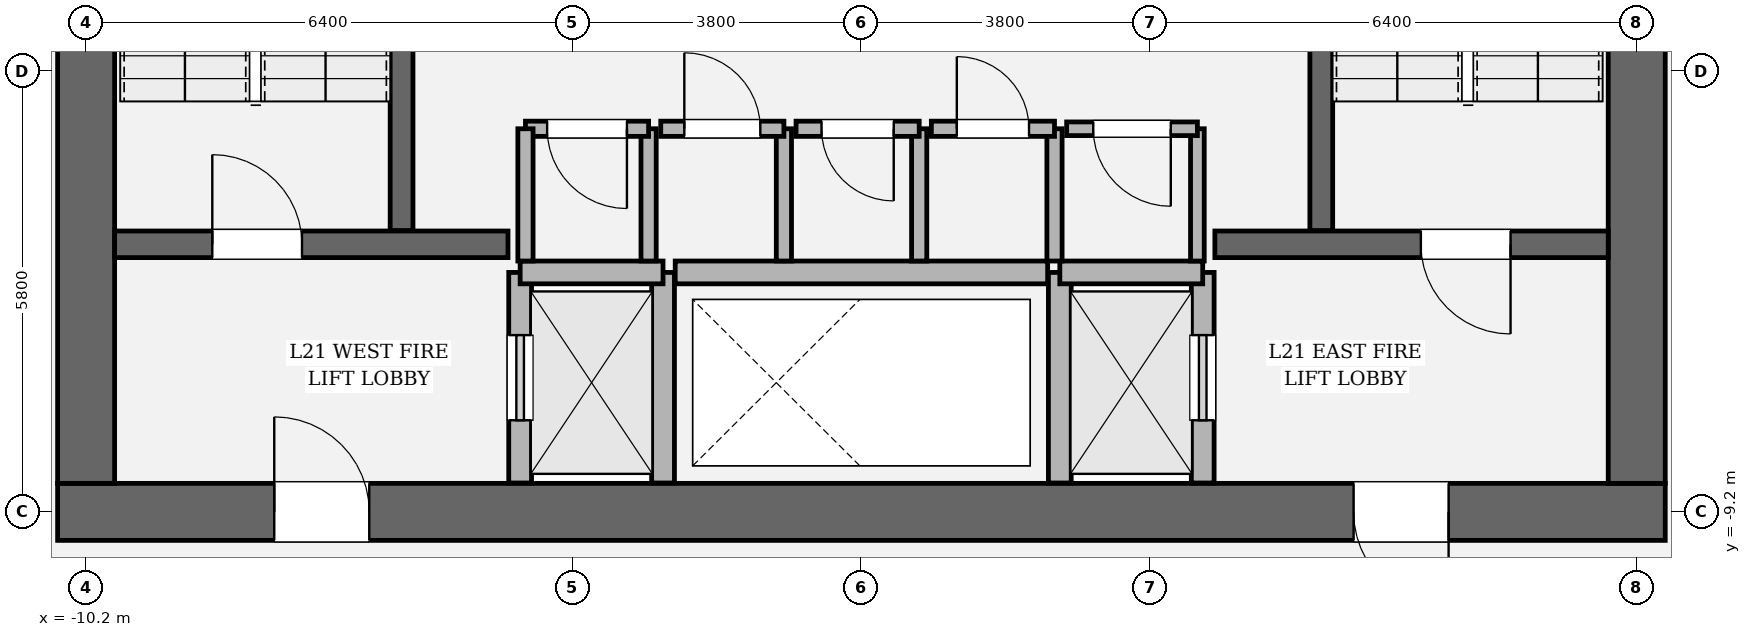
"""IFC4 building model, lengths in metres.
Left out: names, types, materials, properties, quantities, classifications, styles, units other than length and angle.
Written with IfcOpenShell. Run it as: python <this file> out.ifc"""

import sys

from ifc_helpers import new_model, si_unit, direction, frame, frame_2d, origin, place, context, subcontext, project, spatial, rectangle, extrude, element, fill, save


model = new_model("IFC4")
c1 = context("Model", 3, precision=1e-05, world=origin(), true_north=direction((0.0, 1.0)))
c2 = subcontext(c1, "Body", "Model", "MODEL_VIEW")
j1 = project(units=[si_unit("LENGTHUNIT", "METRE"), si_unit("PLANEANGLEUNIT", "RADIAN")], contexts=[c1])
p1 = place(None, origin())
s1 = spatial("IfcSite", under=j1, at=p1, CompositionType="ELEMENT")
p2 = place(p1, origin())
s2 = spatial("IfcBuilding", under=s1, at=p2, CompositionType="ELEMENT")
p3 = place(p2, frame((0.0, 0.0, 93.0)))
s3 = spatial("IfcBuildingStorey", under=s2, at=p3, CompositionType="ELEMENT", Elevation=93.0)
p4 = place(p3, frame((10.575, -9.2, 0.0), z_axis=(0.0, 0.0, 1.0), x_axis=(-1.0, 0.0, 0.0)))
e1 = element("IfcWall", 1, at=p4, inside=s3, PredefinedType="SHEAR", context=c2, shape_type="SweptSolid", body=[
    extrude(rectangle(XDim=21.15, YDim=0.75, at=frame_2d((10.575, 0.0))), origin(), (0.0, 0.0, 1.0), 4.05),
])
p5 = place(p4, frame((2.85, 0.0, 0.0)))
e2 = element("IfcOpeningElement", 2, at=p5, cuts=e1, PredefinedType="OPENING", context=c2, shape_type="SweptSolid", body=[
    extrude(rectangle(XDim=1.25, YDim=2.25, at=frame_2d((0.625, 1.125))), frame((0.0, 0.385, 0.0), z_axis=(0.0, -1.0, 0.0), x_axis=(1.0, 0.0, 0.0)), (0.0, 0.0, 1.0), 0.77),
])
p6 = place(p4, frame((17.05, 0.0, 0.0)))
e3 = element("IfcOpeningElement", 3, at=p6, cuts=e1, PredefinedType="OPENING", context=c2, shape_type="SweptSolid", body=[
    extrude(rectangle(XDim=1.25, YDim=2.25, at=frame_2d((0.625, 1.125))), frame((0.0, 0.385, 0.0), z_axis=(0.0, -1.0, 0.0), x_axis=(1.0, 0.0, 0.0)), (0.0, 0.0, 1.0), 0.77),
])
p7 = place(p3, frame((-10.2, -8.825, 0.0), z_axis=(0.0, 0.0, 1.0), x_axis=(0.0, 1.0, 0.0)))
e4 = element("IfcWall", 4, at=p7, inside=s3, PredefinedType="SHEAR", context=c2, shape_type="SweptSolid", body=[
    extrude(rectangle(XDim=17.65, YDim=0.75, at=frame_2d((8.825, 0.0))), origin(), (0.0, 0.0, 1.0), 4.05),
])
p8 = place(p7, frame((12.615, 0.0, 0.0)))
e5 = element("IfcOpeningElement", 5, at=p8, cuts=e4, PredefinedType="OPENING", context=c2, shape_type="SweptSolid", body=[
    extrude(rectangle(XDim=1.18, YDim=2.2, at=frame_2d((0.59, 1.1))), frame((0.0, 0.385, 0.0), z_axis=(0.0, -1.0, 0.0), x_axis=(1.0, 0.0, 0.0)), (0.0, 0.0, 1.0), 0.77),
])
p9 = place(p3, frame((10.2, 8.825, 0.0), z_axis=(0.0, 0.0, 1.0), x_axis=(0.0, -1.0, 0.0)))
e6 = element("IfcWall", 6, at=p9, inside=s3, PredefinedType="SHEAR", context=c2, shape_type="SweptSolid", body=[
    extrude(rectangle(XDim=17.65, YDim=0.75, at=frame_2d((8.825, 0.0))), origin(), (0.0, 0.0, 1.0), 4.05),
])
p10 = place(p9, frame((3.855, 0.0, 0.0)))
e7 = element("IfcOpeningElement", 7, at=p10, cuts=e6, PredefinedType="OPENING", context=c2, shape_type="SweptSolid", body=[
    extrude(rectangle(XDim=1.18, YDim=2.2, at=frame_2d((0.59, 1.1))), frame((0.0, 0.385, 0.0), z_axis=(0.0, -1.0, 0.0), x_axis=(1.0, 0.0, 0.0)), (0.0, 0.0, 1.0), 0.77),
])
for number, where, z_axis, x_axis in (
    (8, (-6.05, -5.5, 0.0), (0.0, 0.0, 1.0), (0.0, 1.0, 0.0)),
    (9, (6.05, 3.45, 0.0), (0.0, 0.0, 1.0), (0.0, -1.0, 0.0)),
):
    element("IfcWall", number, at=place(p3, frame(where, z_axis=z_axis, x_axis=x_axis)), inside=s3, PredefinedType="SOLIDWALL", context=c2, shape_type="SweptSolid", body=[
        extrude(rectangle(XDim=8.95, YDim=0.3, at=frame_2d((4.475, 0.0))), origin(), (0.0, 0.0, 1.0), 4.05),
    ])
p11 = place(p3, frame((-9.825, -5.68, 0.0), z_axis=(0.0, 0.0, 1.0), x_axis=(1.0, 0.0, 0.0)))
e10 = element("IfcWall", 10, at=p11, inside=s3, PredefinedType="SOLIDWALL", context=c2, shape_type="SweptSolid", body=[
    extrude(rectangle(XDim=5.175, YDim=0.35, at=frame_2d((2.587, 0.0))), origin(), (0.0, 0.0, 1.0), 4.05),
])
p12 = place(p11, frame((1.285, 0.0, 0.0)))
e11 = element("IfcOpeningElement", 11, at=p12, cuts=e10, PredefinedType="OPENING", context=c2, shape_type="SweptSolid", body=[
    extrude(rectangle(XDim=1.18, YDim=2.2, at=frame_2d((0.59, 1.1))), frame((0.0, 0.185, 0.0), z_axis=(0.0, -1.0, 0.0), x_axis=(1.0, 0.0, 0.0)), (0.0, 0.0, 1.0), 0.37),
])
p13 = place(p3, frame((4.65, -5.68, 0.0), z_axis=(0.0, 0.0, 1.0), x_axis=(1.0, 0.0, 0.0)))
e12 = element("IfcWall", 12, at=p13, inside=s3, PredefinedType="SOLIDWALL", context=c2, shape_type="SweptSolid", body=[
    extrude(rectangle(XDim=5.175, YDim=0.35, at=frame_2d((2.587, 0.0))), origin(), (0.0, 0.0, 1.0), 4.05),
])
p14 = place(p13, frame((2.71, 0.0, 0.0)))
e13 = element("IfcOpeningElement", 13, at=p14, cuts=e12, PredefinedType="OPENING", context=c2, shape_type="SweptSolid", body=[
    extrude(rectangle(XDim=1.18, YDim=2.2, at=frame_2d((0.59, 1.1))), frame((0.0, 0.185, 0.0), z_axis=(0.0, -1.0, 0.0), x_axis=(1.0, 0.0, 0.0)), (0.0, 0.0, 1.0), 0.37),
])
p15 = place(p3, frame((-4.49, -8.82, 0.0), z_axis=(0.0, 0.0, 1.0), x_axis=(0.0, 1.0, 0.0)))
e14 = element("IfcWall", 14, at=p15, inside=s3, PredefinedType="SOLIDWALL", context=c2, shape_type="SweptSolid", body=[
    extrude(rectangle(XDim=2.77, YDim=0.3, at=frame_2d((1.385, 0.0))), origin(), (0.0, 0.0, 1.0), 3.81),
])
p16 = place(p15, frame((0.825, 0.0, 0.0)))
e15 = element("IfcOpeningElement", 15, at=p16, cuts=e14, PredefinedType="OPENING", context=c2, shape_type="SweptSolid", body=[
    extrude(rectangle(XDim=1.12, YDim=2.25, at=frame_2d((0.56, 1.125))), frame((0.0, 0.16, 0.0), z_axis=(0.0, -1.0, 0.0), x_axis=(1.0, 0.0, 0.0)), (0.0, 0.0, 1.0), 0.32),
])
p17 = place(p3, frame((-2.61, -8.82, 0.0), z_axis=(0.0, 0.0, 1.0), x_axis=(0.0, 1.0, 0.0)))
e16 = element("IfcWall", 16, at=p17, inside=s3, PredefinedType="SOLIDWALL", context=c2, shape_type="SweptSolid", body=[
    extrude(rectangle(XDim=2.77, YDim=0.3, at=frame_2d((1.385, 0.0))), origin(), (0.0, 0.0, 1.0), 3.81),
])
p18 = place(p3, frame((-4.49, -6.05, 0.0), z_axis=(0.0, 0.0, 1.0), x_axis=(1.0, 0.0, 0.0)))
e17 = element("IfcWall", 17, at=p18, inside=s3, PredefinedType="SOLIDWALL", context=c2, shape_type="SweptSolid", body=[
    extrude(rectangle(XDim=1.88, YDim=0.3, at=frame_2d((0.94, 0.0))), origin(), (0.0, 0.0, 1.0), 3.81),
])
p19 = place(p3, frame((4.49, -8.82, 0.0), z_axis=(0.0, 0.0, 1.0), x_axis=(0.0, 1.0, 0.0)))
e18 = element("IfcWall", 18, at=p19, inside=s3, PredefinedType="SOLIDWALL", context=c2, shape_type="SweptSolid", body=[
    extrude(rectangle(XDim=2.77, YDim=0.3, at=frame_2d((1.385, 0.0))), origin(), (0.0, 0.0, 1.0), 3.81),
])
p20 = place(p19, frame((0.825, 0.0, 0.0)))
e19 = element("IfcOpeningElement", 19, at=p20, cuts=e18, PredefinedType="OPENING", context=c2, shape_type="SweptSolid", body=[
    extrude(rectangle(XDim=1.12, YDim=2.25, at=frame_2d((0.56, 1.125))), frame((0.0, 0.16, 0.0), z_axis=(0.0, -1.0, 0.0), x_axis=(1.0, 0.0, 0.0)), (0.0, 0.0, 1.0), 0.32),
])
p21 = place(p3, frame((2.61, -8.82, 0.0), z_axis=(0.0, 0.0, 1.0), x_axis=(0.0, 1.0, 0.0)))
e20 = element("IfcWall", 20, at=p21, inside=s3, PredefinedType="SOLIDWALL", context=c2, shape_type="SweptSolid", body=[
    extrude(rectangle(XDim=2.77, YDim=0.3, at=frame_2d((1.385, 0.0))), origin(), (0.0, 0.0, 1.0), 3.81),
])
p22 = place(p3, frame((2.61, -6.05, 0.0), z_axis=(0.0, 0.0, 1.0), x_axis=(1.0, 0.0, 0.0)))
e21 = element("IfcWall", 21, at=p22, inside=s3, PredefinedType="SOLIDWALL", context=c2, shape_type="SweptSolid", body=[
    extrude(rectangle(XDim=1.88, YDim=0.3, at=frame_2d((0.94, 0.0))), origin(), (0.0, 0.0, 1.0), 3.81),
])
p23 = place(p3, frame((-2.45, -6.05, 0.0), z_axis=(0.0, 0.0, 1.0), x_axis=(1.0, 0.0, 0.0)))
e22 = element("IfcWall", 22, at=p23, inside=s3, PredefinedType="SOLIDWALL", context=c2, shape_type="SweptSolid", body=[
    extrude(rectangle(XDim=4.9, YDim=0.3, at=frame_2d((2.45, 0.0))), origin(), (0.0, 0.0, 1.0), 3.81),
])
p24 = place(p3, frame((-2.8, -5.9, 0.0), z_axis=(0.0, 0.0, 1.0), x_axis=(0.0, 1.0, 0.0)))
e23 = element("IfcWall", 23, at=p24, inside=s3, PredefinedType="SOLIDWALL", context=c2, shape_type="SweptSolid", body=[
    extrude(rectangle(XDim=1.74, YDim=0.2, at=frame_2d((0.87, 0.0))), origin(), (0.0, 0.0, 1.0), 3.81),
])
p25 = place(p3, frame((-2.8, -4.16, 0.0), z_axis=(0.0, 0.0, 1.0), x_axis=(-1.0, 0.0, 0.0)))
e24 = element("IfcWall", 24, at=p25, inside=s3, PredefinedType="SOLIDWALL", context=c2, shape_type="SweptSolid", body=[
    extrude(rectangle(XDim=1.62, YDim=0.2, at=frame_2d((0.81, 0.0))), origin(), (0.0, 0.0, 1.0), 3.81),
])
p26 = place(p25, frame((0.285, 0.0, 0.0)))
e25 = element("IfcOpeningElement", 25, at=p26, cuts=e24, PredefinedType="OPENING", context=c2, shape_type="SweptSolid", body=[
    extrude(rectangle(XDim=1.05, YDim=2.2, at=frame_2d((0.525, 1.1))), frame((0.0, 0.11, 0.0), z_axis=(0.0, -1.0, 0.0), x_axis=(1.0, 0.0, 0.0)), (0.0, 0.0, 1.0), 0.22),
])
for number, where, z_axis, x_axis in (
    (26, (-4.42, -4.16, 0.0), (0.0, 0.0, 1.0), (0.0, -1.0, 0.0)),
    (27, (-1.02, -5.9, 0.0), (0.0, 0.0, 1.0), (0.0, 1.0, 0.0)),
):
    element("IfcWall", number, at=place(p3, frame(where, z_axis=z_axis, x_axis=x_axis)), inside=s3, PredefinedType="SOLIDWALL", context=c2, shape_type="SweptSolid", body=[
        extrude(rectangle(XDim=1.74, YDim=0.2, at=frame_2d((0.87, 0.0))), origin(), (0.0, 0.0, 1.0), 3.81),
    ])
p27 = place(p3, frame((-1.02, -4.16, 0.0), z_axis=(0.0, 0.0, 1.0), x_axis=(-1.0, 0.0, 0.0)))
e28 = element("IfcWall", 28, at=p27, inside=s3, PredefinedType="SOLIDWALL", context=c2, shape_type="SweptSolid", body=[
    extrude(rectangle(XDim=1.62, YDim=0.2, at=frame_2d((0.81, 0.0))), origin(), (0.0, 0.0, 1.0), 3.81),
])
p28 = place(p27, frame((0.31, 0.0, 0.0)))
e29 = element("IfcOpeningElement", 29, at=p28, cuts=e28, PredefinedType="OPENING", context=c2, shape_type="SweptSolid", body=[
    extrude(rectangle(XDim=1.0, YDim=2.15, at=frame_2d((0.5, 1.075))), frame((0.0, 0.11, 0.0), z_axis=(0.0, -1.0, 0.0), x_axis=(1.0, 0.0, 0.0)), (0.0, 0.0, 1.0), 0.22),
])
p29 = place(p3, frame((0.76, -5.9, 0.0), z_axis=(0.0, 0.0, 1.0), x_axis=(0.0, 1.0, 0.0)))
e30 = element("IfcWall", 30, at=p29, inside=s3, PredefinedType="SOLIDWALL", context=c2, shape_type="SweptSolid", body=[
    extrude(rectangle(XDim=1.74, YDim=0.2, at=frame_2d((0.87, 0.0))), origin(), (0.0, 0.0, 1.0), 3.81),
])
p30 = place(p3, frame((0.76, -4.16, 0.0), z_axis=(0.0, 0.0, 1.0), x_axis=(-1.0, 0.0, 0.0)))
e31 = element("IfcWall", 31, at=p30, inside=s3, PredefinedType="SOLIDWALL", context=c2, shape_type="SweptSolid", body=[
    extrude(rectangle(XDim=1.62, YDim=0.2, at=frame_2d((0.81, 0.0))), origin(), (0.0, 0.0, 1.0), 3.81),
])
p31 = place(p30, frame((0.335, 0.0, 0.0)))
e32 = element("IfcOpeningElement", 32, at=p31, cuts=e31, PredefinedType="OPENING", context=c2, shape_type="SweptSolid", body=[
    extrude(rectangle(XDim=0.95, YDim=2.15, at=frame_2d((0.475, 1.075))), frame((0.0, 0.11, 0.0), z_axis=(0.0, -1.0, 0.0), x_axis=(1.0, 0.0, 0.0)), (0.0, 0.0, 1.0), 0.22),
])
p32 = place(p3, frame((2.54, -5.9, 0.0), z_axis=(0.0, 0.0, 1.0), x_axis=(0.0, 1.0, 0.0)))
e33 = element("IfcWall", 33, at=p32, inside=s3, PredefinedType="SOLIDWALL", context=c2, shape_type="SweptSolid", body=[
    extrude(rectangle(XDim=1.74, YDim=0.2, at=frame_2d((0.87, 0.0))), origin(), (0.0, 0.0, 1.0), 3.81),
])
p33 = place(p3, frame((2.54, -4.16, 0.0), z_axis=(0.0, 0.0, 1.0), x_axis=(-1.0, 0.0, 0.0)))
e34 = element("IfcWall", 34, at=p33, inside=s3, PredefinedType="SOLIDWALL", context=c2, shape_type="SweptSolid", body=[
    extrude(rectangle(XDim=1.62, YDim=0.2, at=frame_2d((0.81, 0.0))), origin(), (0.0, 0.0, 1.0), 3.81),
])
p34 = place(p33, frame((0.335, 0.0, 0.0)))
e35 = element("IfcOpeningElement", 35, at=p34, cuts=e34, PredefinedType="OPENING", context=c2, shape_type="SweptSolid", body=[
    extrude(rectangle(XDim=0.95, YDim=2.15, at=frame_2d((0.475, 1.075))), frame((0.0, 0.11, 0.0), z_axis=(0.0, -1.0, 0.0), x_axis=(1.0, 0.0, 0.0)), (0.0, 0.0, 1.0), 0.22),
])
p35 = place(p3, frame((4.42, -5.9, 0.0), z_axis=(0.0, 0.0, 1.0), x_axis=(0.0, 1.0, 0.0)))
e36 = element("IfcWall", 36, at=p35, inside=s3, PredefinedType="PARTITIONING", context=c2, shape_type="SweptSolid", body=[
    extrude(rectangle(XDim=1.74, YDim=0.18, at=frame_2d((0.87, 0.0))), origin(), (0.0, 0.0, 1.0), 3.81),
])
p36 = place(p3, frame((4.42, -4.16, 0.0), z_axis=(0.0, 0.0, 1.0), x_axis=(-1.0, 0.0, 0.0)))
e37 = element("IfcWall", 37, at=p36, inside=s3, PredefinedType="PARTITIONING", context=c2, shape_type="SweptSolid", body=[
    extrude(rectangle(XDim=1.72, YDim=0.18, at=frame_2d((0.86, 0.0))), origin(), (0.0, 0.0, 1.0), 3.81),
])
p37 = place(p36, frame((0.35, 0.0, 0.0)))
e38 = element("IfcOpeningElement", 38, at=p37, cuts=e37, PredefinedType="OPENING", context=c2, shape_type="SweptSolid", body=[
    extrude(rectangle(XDim=1.02, YDim=2.2, at=frame_2d((0.51, 1.1))), frame((0.0, 0.1, 0.0), z_axis=(0.0, -1.0, 0.0), x_axis=(1.0, 0.0, 0.0)), (0.0, 0.0, 1.0), 0.2),
])
p38 = place(p12, origin())
e39 = element("IfcDoor", 39, at=p38, inside=s3, OperationType="SINGLE_SWING_LEFT", PredefinedType="DOOR", context=c2, shape_type="SweptSolid", body=[
    extrude(rectangle(XDim=1.18, YDim=2.2, at=frame_2d((0.59, 1.1))), frame((0.0, 0.025, 0.0), z_axis=(0.0, -1.0, 0.0), x_axis=(1.0, 0.0, 0.0)), (0.0, 0.0, 1.0), 0.05),
])
fill(e11, e39)
p39 = place(p14, origin())
e40 = element("IfcDoor", 40, at=p39, inside=s3, OperationType="SINGLE_SWING_RIGHT", PredefinedType="DOOR", context=c2, shape_type="SweptSolid", body=[
    extrude(rectangle(XDim=1.18, YDim=2.2, at=frame_2d((0.59, 1.1))), frame((0.0, 0.025, 0.0), z_axis=(0.0, -1.0, 0.0), x_axis=(1.0, 0.0, 0.0)), (0.0, 0.0, 1.0), 0.05),
])
fill(e13, e40)
p40 = place(p5, origin())
e41 = element("IfcDoor", 41, at=p40, inside=s3, OperationType="SINGLE_SWING_LEFT", PredefinedType="DOOR", context=c2, shape_type="SweptSolid", body=[
    extrude(rectangle(XDim=1.25, YDim=2.25, at=frame_2d((0.625, 1.125))), frame((0.0, 0.025, 0.0), z_axis=(0.0, -1.0, 0.0), x_axis=(1.0, 0.0, 0.0)), (0.0, 0.0, 1.0), 0.05),
])
fill(e2, e41)
p41 = place(p6, origin())
e42 = element("IfcDoor", 42, at=p41, inside=s3, OperationType="SINGLE_SWING_RIGHT", PredefinedType="DOOR", context=c2, shape_type="SweptSolid", body=[
    extrude(rectangle(XDim=1.25, YDim=2.25, at=frame_2d((0.625, 1.125))), frame((0.0, 0.025, 0.0), z_axis=(0.0, -1.0, 0.0), x_axis=(1.0, 0.0, 0.0)), (0.0, 0.0, 1.0), 0.05),
])
fill(e3, e42)
p42 = place(p16, origin())
e43 = element("IfcDoor", 43, at=p42, inside=s3, OperationType="SLIDING_TO_LEFT", PredefinedType="DOOR", context=c2, shape_type="SweptSolid", body=[
    extrude(rectangle(XDim=1.12, YDim=2.25, at=frame_2d((0.56, 1.125))), frame((0.0, 0.025, 0.0), z_axis=(0.0, -1.0, 0.0), x_axis=(1.0, 0.0, 0.0)), (0.0, 0.0, 1.0), 0.05),
])
fill(e15, e43)
p43 = place(p20, origin())
e44 = element("IfcDoor", 44, at=p43, inside=s3, OperationType="SLIDING_TO_RIGHT", PredefinedType="DOOR", context=c2, shape_type="SweptSolid", body=[
    extrude(rectangle(XDim=1.12, YDim=2.25, at=frame_2d((0.56, 1.125))), frame((0.0, 0.025, 0.0), z_axis=(0.0, -1.0, 0.0), x_axis=(1.0, 0.0, 0.0)), (0.0, 0.0, 1.0), 0.05),
])
fill(e19, e44)
p44 = place(p26, origin())
e45 = element("IfcDoor", 45, at=p44, inside=s3, OperationType="SINGLE_SWING_LEFT", PredefinedType="DOOR", context=c2, shape_type="SweptSolid", body=[
    extrude(rectangle(XDim=1.05, YDim=2.2, at=frame_2d((0.525, 1.1))), frame((0.0, 0.025, 0.0), z_axis=(0.0, -1.0, 0.0), x_axis=(1.0, 0.0, 0.0)), (0.0, 0.0, 1.0), 0.05),
])
fill(e25, e45)
p45 = place(p28, origin())
e46 = element("IfcDoor", 46, at=p45, inside=s3, OperationType="SINGLE_SWING_RIGHT", PredefinedType="DOOR", context=c2, shape_type="SweptSolid", body=[
    extrude(rectangle(XDim=1.0, YDim=2.15, at=frame_2d((0.5, 1.075))), frame((0.0, 0.025, 0.0), z_axis=(0.0, -1.0, 0.0), x_axis=(1.0, 0.0, 0.0)), (0.0, 0.0, 1.0), 0.05),
])
fill(e29, e46)
p46 = place(p31, origin())
e47 = element("IfcDoor", 47, at=p46, inside=s3, OperationType="SINGLE_SWING_LEFT", PredefinedType="DOOR", context=c2, shape_type="SweptSolid", body=[
    extrude(rectangle(XDim=0.95, YDim=2.15, at=frame_2d((0.475, 1.075))), frame((0.0, 0.025, 0.0), z_axis=(0.0, -1.0, 0.0), x_axis=(1.0, 0.0, 0.0)), (0.0, 0.0, 1.0), 0.05),
])
fill(e32, e47)
p47 = place(p34, origin())
e48 = element("IfcDoor", 48, at=p47, inside=s3, OperationType="SINGLE_SWING_RIGHT", PredefinedType="DOOR", context=c2, shape_type="SweptSolid", body=[
    extrude(rectangle(XDim=0.95, YDim=2.15, at=frame_2d((0.475, 1.075))), frame((0.0, 0.025, 0.0), z_axis=(0.0, -1.0, 0.0), x_axis=(1.0, 0.0, 0.0)), (0.0, 0.0, 1.0), 0.05),
])
fill(e35, e48)
p48 = place(p37, origin())
e49 = element("IfcDoor", 49, at=p48, inside=s3, OperationType="SINGLE_SWING_LEFT", PredefinedType="DOOR", context=c2, shape_type="SweptSolid", body=[
    extrude(rectangle(XDim=1.02, YDim=2.2, at=frame_2d((0.51, 1.1))), frame((0.0, 0.025, 0.0), z_axis=(0.0, -1.0, 0.0), x_axis=(1.0, 0.0, 0.0)), (0.0, 0.0, 1.0), 0.05),
])
fill(e38, e49)
save(model, sys.argv[1])
